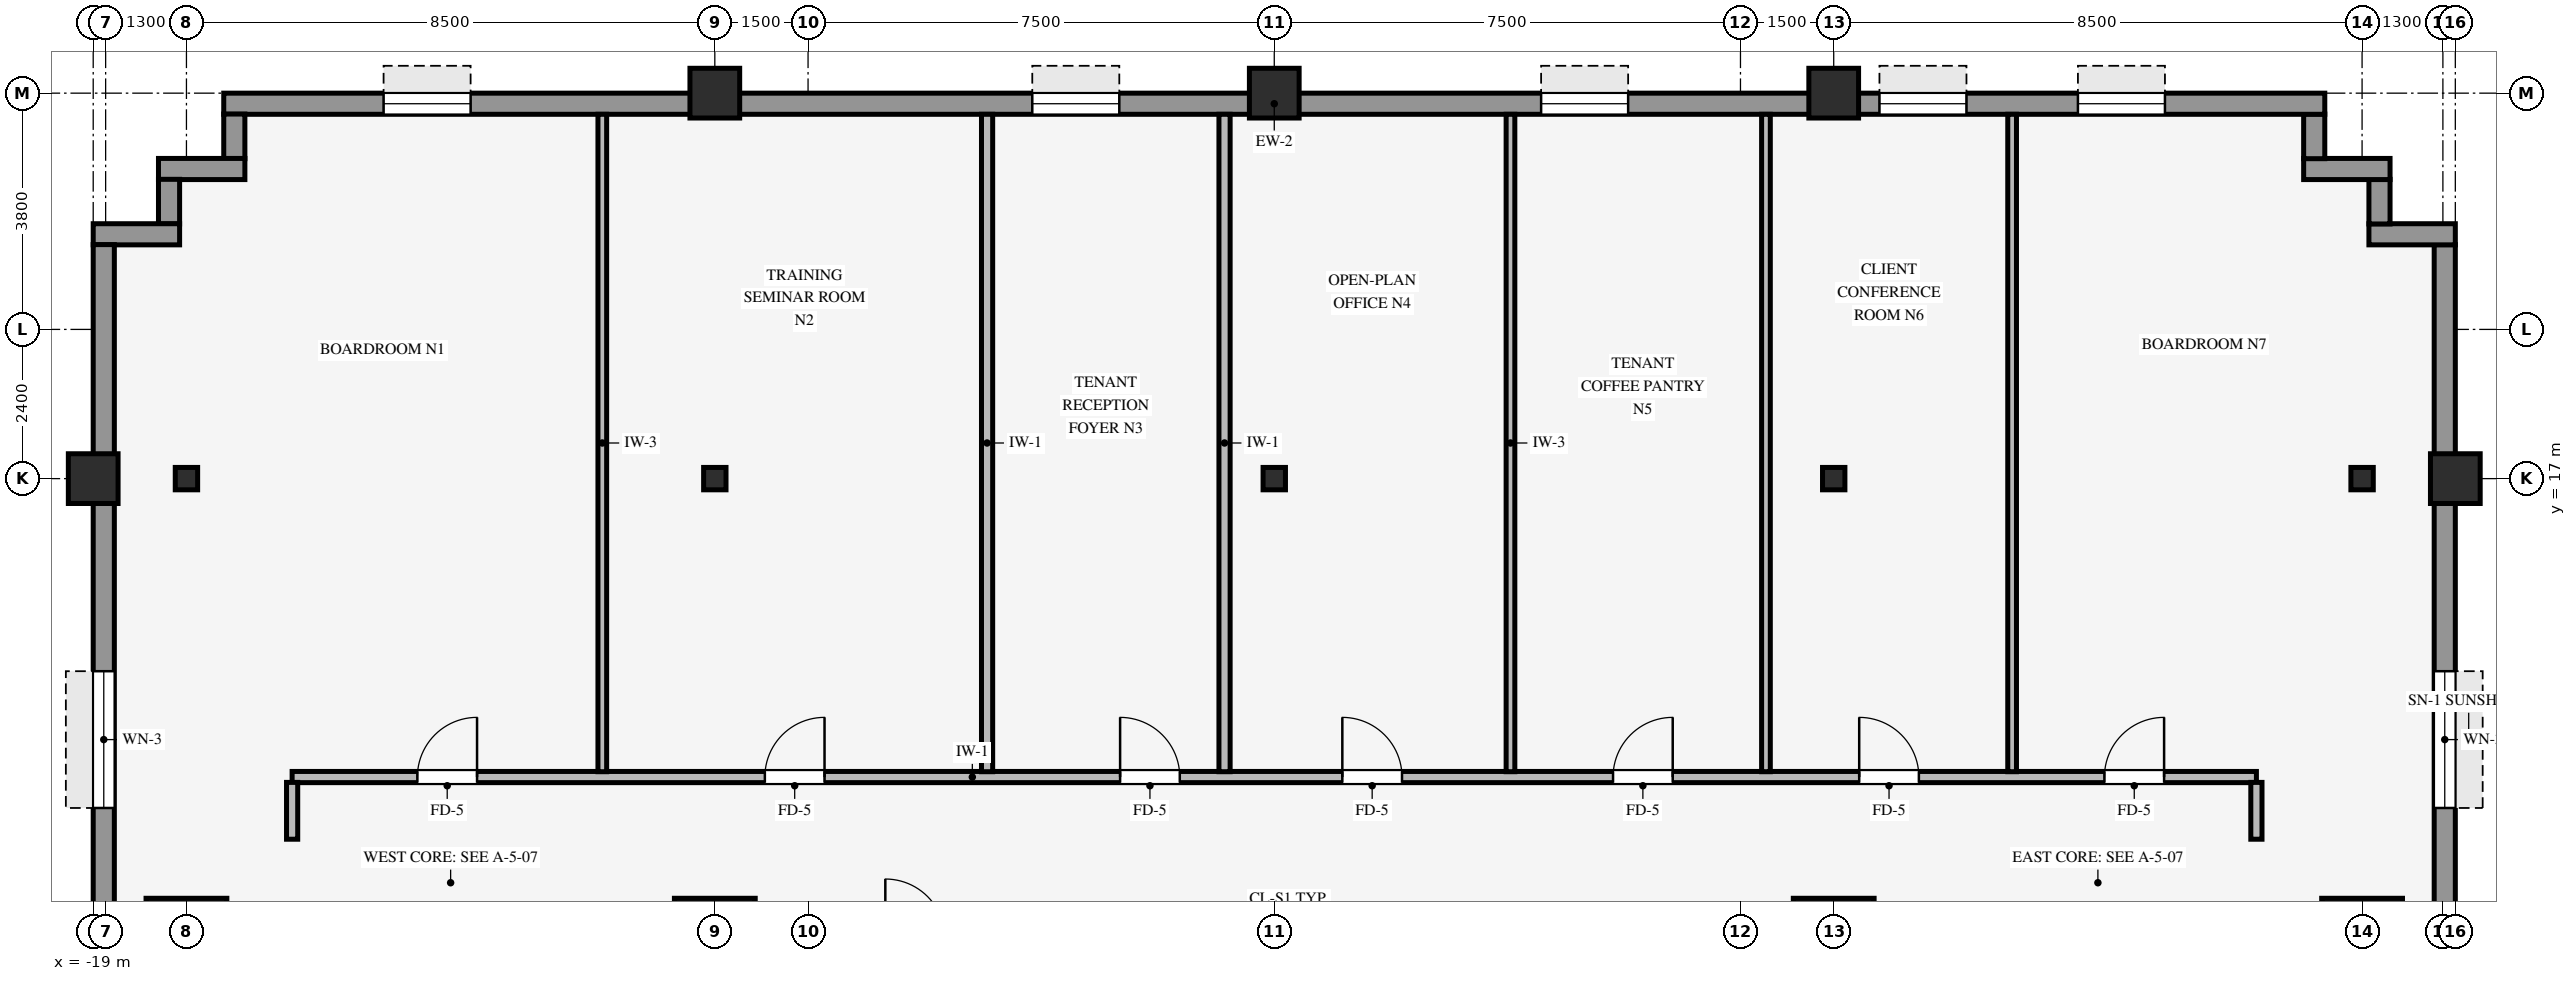
"""IFC4 building model, lengths in metres.
Left out: names, types, materials, properties, quantities, classifications, styles, units other than length and angle.
Written with IfcOpenShell. Run it as: python <this file> out.ifc"""

import sys

from ifc_helpers import new_model, si_unit, direction, frame, frame_2d, origin, origin_2d, place, context, subcontext, project, spatial, rectangle, hollow_rectangle, i_section, extrude, source, transform, mapped, element, fill, save


model = new_model("IFC4")
c1 = context("Model", 3, precision=1e-05, world=origin(), true_north=direction((0.0, 1.0)))
c2 = subcontext(c1, "Body", "Model", "MODEL_VIEW")
j1 = project(units=[si_unit("LENGTHUNIT", "METRE"), si_unit("PLANEANGLEUNIT", "RADIAN")], contexts=[c1])
p1 = place(None, origin())
s1 = spatial("IfcSite", under=j1, at=p1, CompositionType="ELEMENT")
p2 = place(p1, origin())
s2 = spatial("IfcBuilding", under=s1, at=p2, CompositionType="ELEMENT")
p3 = place(p2, frame((0.0, 0.0, 31.25)))
s3 = spatial("IfcBuildingStorey", under=s2, at=p3, CompositionType="ELEMENT", Elevation=31.25)
for number, where, z_axis, x_axis in (
    (1, (-17.5, 9.6, 0.0), (0.0, 0.0, 1.0), (1.0, 0.0, 0.0)),
    (2, (-9.0, 9.6, 0.0), (0.0, 0.0, 1.0), (1.0, 0.0, 0.0)),
    (3, (9.0, 9.6, 0.0), (0.0, 0.0, 1.0), (1.0, 0.0, 0.0)),
    (4, (17.5, 9.6, 0.0), (0.0, 0.0, 1.0), (1.0, 0.0, 0.0)),
):
    element("IfcColumn", number, at=place(p3, frame(where, z_axis=z_axis, x_axis=x_axis)), inside=s3, PredefinedType="COLUMN", context=c2, shape_type="SweptSolid", body=[
        extrude(rectangle(XDim=1.3, YDim=1.3, at=origin_2d()), origin(), (0.0, 0.0, 1.0), 3.37),
    ])
for number, where, z_axis, x_axis in (
    (5, (-19.0, 17.0, 0.0), (0.0, 0.0, 1.0), (1.0, 0.0, 0.0)),
    (6, (19.0, 17.0, 0.0), (0.0, 0.0, 1.0), (1.0, 0.0, 0.0)),
    (7, (-9.0, 23.2, 0.0), (0.0, 0.0, 1.0), (1.0, 0.0, 0.0)),
    (8, (0.0, 23.2, 0.0), (0.0, 0.0, 1.0), (1.0, 0.0, 0.0)),
    (9, (9.0, 23.2, 0.0), (0.0, 0.0, 1.0), (1.0, 0.0, 0.0)),
):
    element("IfcColumn", number, at=place(p3, frame(where, z_axis=z_axis, x_axis=x_axis)), inside=s3, PredefinedType="COLUMN", context=c2, shape_type="SweptSolid", body=[
        extrude(hollow_rectangle(XDim=0.8, YDim=0.8, WallThickness=0.055, InnerFilletRadius=0.055, OuterFilletRadius=0.11, at=origin_2d()), origin(), (0.0, 0.0, 1.0), 3.37),
    ])
for number, where, z_axis, x_axis in (
    (10, (0.0, 17.0, 0.0), (0.0, 0.0, 1.0), (1.0, 0.0, 0.0)),
    (11, (-17.5, 17.0, 0.0), (0.0, 0.0, 1.0), (1.0, 0.0, 0.0)),
    (12, (-9.0, 17.0, 0.0), (0.0, 0.0, 1.0), (1.0, 0.0, 0.0)),
    (13, (9.0, 17.0, 0.0), (0.0, 0.0, 1.0), (1.0, 0.0, 0.0)),
    (14, (17.5, 17.0, 0.0), (0.0, 0.0, 1.0), (1.0, 0.0, 0.0)),
):
    element("IfcColumn", number, at=place(p3, frame(where, z_axis=z_axis, x_axis=x_axis)), inside=s3, PredefinedType="COLUMN", context=c2, shape_type="SweptSolid", body=[
        extrude(i_section(OverallWidth=0.36, OverallDepth=0.36, WebThickness=0.021, FlangeThickness=0.021, FilletRadius=0.018, at=origin_2d()), origin(), (0.0, 0.0, 1.0), 3.37),
    ])
p4 = place(p3, frame((18.83, -20.764, 0.0), z_axis=(0.0, 0.0, 1.0), x_axis=(0.0, 1.0, 0.0)))
e15 = element("IfcWall", 15, at=p4, inside=s3, PredefinedType="STANDARD", context=c2, shape_type="SweptSolid", body=[
    extrude(rectangle(XDim=41.528, YDim=0.34, at=frame_2d((20.764, 0.0))), origin(), (0.0, 0.0, 1.0), 2.705),
])
p5 = place(p4, frame((6.862, 0.0, 0.8)))
e16 = element("IfcOpeningElement", 16, at=p5, cuts=e15, PredefinedType="OPENING", context=c2, shape_type="SweptSolid", body=[
    extrude(rectangle(XDim=2.2, YDim=1.65, at=frame_2d((1.1, 0.825))), frame((0.0, 0.18, 0.0), z_axis=(0.0, -1.0, 0.0), x_axis=(1.0, 0.0, 0.0)), (0.0, 0.0, 1.0), 0.36),
])
p6 = place(p4, frame((32.467, 0.0, 0.8)))
e17 = element("IfcOpeningElement", 17, at=p6, cuts=e15, PredefinedType="OPENING", context=c2, shape_type="SweptSolid", body=[
    extrude(rectangle(XDim=2.2, YDim=1.65, at=frame_2d((1.1, 0.825))), frame((0.0, 0.18, 0.0), z_axis=(0.0, -1.0, 0.0), x_axis=(1.0, 0.0, 0.0)), (0.0, 0.0, 1.0), 0.36),
])
p7 = place(p3, frame((17.61, 20.93, 0.0), z_axis=(0.0, 0.0, 1.0), x_axis=(1.0, 0.0, 0.0)))
e18 = element("IfcWall", 18, at=p7, inside=s3, PredefinedType="STANDARD", context=c2, shape_type="SweptSolid", body=[
    extrude(rectangle(XDim=1.39, YDim=0.34, at=frame_2d((0.695, 0.0))), origin(), (0.0, 0.0, 1.0), 3.36),
])
p8 = place(p3, frame((17.78, 21.096, 0.0), z_axis=(0.0, 0.0, 1.0), x_axis=(0.0, 1.0, 0.0)))
e19 = element("IfcWall", 19, at=p8, inside=s3, PredefinedType="STANDARD", context=c2, shape_type="SweptSolid", body=[
    extrude(rectangle(XDim=0.718, YDim=0.34, at=frame_2d((0.359, 0.0))), origin(), (0.0, 0.0, 1.0), 3.36),
])
p9 = place(p3, frame((16.56, 21.98, 0.0), z_axis=(0.0, 0.0, 1.0), x_axis=(1.0, 0.0, 0.0)))
e20 = element("IfcWall", 20, at=p9, inside=s3, PredefinedType="STANDARD", context=c2, shape_type="SweptSolid", body=[
    extrude(rectangle(XDim=1.39, YDim=0.34, at=frame_2d((0.695, 0.0))), origin(), (0.0, 0.0, 1.0), 3.36),
])
p10 = place(p3, frame((16.73, 22.146, 0.0), z_axis=(0.0, 0.0, 1.0), x_axis=(0.0, 1.0, 0.0)))
e21 = element("IfcWall", 21, at=p10, inside=s3, PredefinedType="STANDARD", context=c2, shape_type="SweptSolid", body=[
    extrude(rectangle(XDim=0.718, YDim=0.34, at=frame_2d((0.359, 0.0))), origin(), (0.0, 0.0, 1.0), 3.36),
])
p11 = place(p3, frame((-16.9, 23.03, 0.0), z_axis=(0.0, 0.0, 1.0), x_axis=(1.0, 0.0, 0.0)))
e22 = element("IfcWall", 22, at=p11, inside=s3, PredefinedType="STANDARD", context=c2, shape_type="SweptSolid", body=[
    extrude(rectangle(XDim=33.8, YDim=0.34, at=frame_2d((16.9, 0.0))), origin(), (0.0, 0.0, 1.0), 2.705),
])
p12 = place(p11, frame((2.571, 0.0, 0.8)))
e23 = element("IfcOpeningElement", 23, at=p12, cuts=e22, PredefinedType="OPENING", context=c2, shape_type="SweptSolid", body=[
    extrude(rectangle(XDim=1.4, YDim=1.65, at=frame_2d((0.7, 0.825))), frame((0.0, 0.18, 0.0), z_axis=(0.0, -1.0, 0.0), x_axis=(1.0, 0.0, 0.0)), (0.0, 0.0, 1.0), 0.36),
])
p13 = place(p11, frame((13.007, 0.0, 0.8)))
e24 = element("IfcOpeningElement", 24, at=p13, cuts=e22, PredefinedType="OPENING", context=c2, shape_type="SweptSolid", body=[
    extrude(rectangle(XDim=1.4, YDim=1.65, at=frame_2d((0.7, 0.825))), frame((0.0, 0.18, 0.0), z_axis=(0.0, -1.0, 0.0), x_axis=(1.0, 0.0, 0.0)), (0.0, 0.0, 1.0), 0.36),
])
p14 = place(p11, frame((21.193, 0.0, 0.8)))
e25 = element("IfcOpeningElement", 25, at=p14, cuts=e22, PredefinedType="OPENING", context=c2, shape_type="SweptSolid", body=[
    extrude(rectangle(XDim=1.4, YDim=1.65, at=frame_2d((0.7, 0.825))), frame((0.0, 0.18, 0.0), z_axis=(0.0, -1.0, 0.0), x_axis=(1.0, 0.0, 0.0)), (0.0, 0.0, 1.0), 0.36),
])
p15 = place(p11, frame((26.636, 0.0, 0.8)))
e26 = element("IfcOpeningElement", 26, at=p15, cuts=e22, PredefinedType="OPENING", context=c2, shape_type="SweptSolid", body=[
    extrude(rectangle(XDim=1.4, YDim=1.65, at=frame_2d((0.7, 0.825))), frame((0.0, 0.18, 0.0), z_axis=(0.0, -1.0, 0.0), x_axis=(1.0, 0.0, 0.0)), (0.0, 0.0, 1.0), 0.36),
])
p16 = place(p11, frame((29.829, 0.0, 0.8)))
e27 = element("IfcOpeningElement", 27, at=p16, cuts=e22, PredefinedType="OPENING", context=c2, shape_type="SweptSolid", body=[
    extrude(rectangle(XDim=1.4, YDim=1.65, at=frame_2d((0.7, 0.825))), frame((0.0, 0.18, 0.0), z_axis=(0.0, -1.0, 0.0), x_axis=(1.0, 0.0, 0.0)), (0.0, 0.0, 1.0), 0.36),
])
p17 = place(p3, frame((-16.73, 22.146, 0.0), z_axis=(0.0, 0.0, 1.0), x_axis=(0.0, 1.0, 0.0)))
e28 = element("IfcWall", 28, at=p17, inside=s3, PredefinedType="STANDARD", context=c2, shape_type="SweptSolid", body=[
    extrude(rectangle(XDim=0.718, YDim=0.34, at=frame_2d((0.359, 0.0))), origin(), (0.0, 0.0, 1.0), 3.36),
])
p18 = place(p3, frame((-17.95, 21.98, 0.0), z_axis=(0.0, 0.0, 1.0), x_axis=(1.0, 0.0, 0.0)))
e29 = element("IfcWall", 29, at=p18, inside=s3, PredefinedType="STANDARD", context=c2, shape_type="SweptSolid", body=[
    extrude(rectangle(XDim=1.39, YDim=0.34, at=frame_2d((0.695, 0.0))), origin(), (0.0, 0.0, 1.0), 3.36),
])
p19 = place(p3, frame((-17.78, 21.096, 0.0), z_axis=(0.0, 0.0, 1.0), x_axis=(0.0, 1.0, 0.0)))
e30 = element("IfcWall", 30, at=p19, inside=s3, PredefinedType="STANDARD", context=c2, shape_type="SweptSolid", body=[
    extrude(rectangle(XDim=0.718, YDim=0.34, at=frame_2d((0.359, 0.0))), origin(), (0.0, 0.0, 1.0), 3.36),
])
p20 = place(p3, frame((-19.0, 20.93, 0.0), z_axis=(0.0, 0.0, 1.0), x_axis=(1.0, 0.0, 0.0)))
e31 = element("IfcWall", 31, at=p20, inside=s3, PredefinedType="STANDARD", context=c2, shape_type="SweptSolid", body=[
    extrude(rectangle(XDim=1.39, YDim=0.34, at=frame_2d((0.695, 0.0))), origin(), (0.0, 0.0, 1.0), 3.36),
])
p21 = place(p3, frame((-18.83, -20.764, 0.0), z_axis=(0.0, 0.0, 1.0), x_axis=(0.0, 1.0, 0.0)))
e32 = element("IfcWall", 32, at=p21, inside=s3, PredefinedType="STANDARD", context=c2, shape_type="SweptSolid", body=[
    extrude(rectangle(XDim=41.528, YDim=0.34, at=frame_2d((20.764, 0.0))), origin(), (0.0, 0.0, 1.0), 2.705),
])
p22 = place(p21, frame((6.864, 0.0, 0.0)))
e33 = element("IfcOpeningElement", 33, at=p22, cuts=e32, PredefinedType="OPENING", context=c2, shape_type="SweptSolid", body=[
    extrude(rectangle(XDim=1.05, YDim=2.1, at=frame_2d((0.525, 1.05))), frame((0.0, 0.18, 0.0), z_axis=(0.0, -1.0, 0.0), x_axis=(1.0, 0.0, 0.0)), (0.0, 0.0, 1.0), 0.36),
])
p23 = place(p21, frame((32.467, 0.0, 0.8)))
e34 = element("IfcOpeningElement", 34, at=p23, cuts=e32, PredefinedType="OPENING", context=c2, shape_type="SweptSolid", body=[
    extrude(rectangle(XDim=2.2, YDim=1.65, at=frame_2d((1.1, 0.825))), frame((0.0, 0.18, 0.0), z_axis=(0.0, -1.0, 0.0), x_axis=(1.0, 0.0, 0.0)), (0.0, 0.0, 1.0), 0.36),
])
p24 = place(p3, frame((-15.8, 12.2, 0.0), z_axis=(0.0, 0.0, 1.0), x_axis=(1.0, 0.0, 0.0)))
e35 = element("IfcWall", 35, at=p24, inside=s3, PredefinedType="PARTITIONING", context=c2, shape_type="SweptSolid", body=[
    extrude(rectangle(XDim=31.6, YDim=0.18, at=frame_2d((15.8, 0.0))), origin(), (0.0, 0.0, 1.0), 3.36),
])
p25 = place(p24, frame((7.605, 0.0, 0.0)))
e36 = element("IfcOpeningElement", 36, at=p25, cuts=e35, PredefinedType="OPENING", context=c2, shape_type="SweptSolid", body=[
    extrude(rectangle(XDim=0.96, YDim=2.1, at=frame_2d((0.48, 1.05))), frame((0.0, 0.1, 0.0), z_axis=(0.0, -1.0, 0.0), x_axis=(1.0, 0.0, 0.0)), (0.0, 0.0, 1.0), 0.2),
])
p26 = place(p24, frame((2.015, 0.0, 0.0)))
e37 = element("IfcOpeningElement", 37, at=p26, cuts=e35, PredefinedType="OPENING", context=c2, shape_type="SweptSolid", body=[
    extrude(rectangle(XDim=0.96, YDim=2.1, at=frame_2d((0.48, 1.05))), frame((0.0, 0.1, 0.0), z_axis=(0.0, -1.0, 0.0), x_axis=(1.0, 0.0, 0.0)), (0.0, 0.0, 1.0), 0.2),
])
p27 = place(p24, frame((16.895, 0.0, 0.0)))
e38 = element("IfcOpeningElement", 38, at=p27, cuts=e35, PredefinedType="OPENING", context=c2, shape_type="SweptSolid", body=[
    extrude(rectangle(XDim=0.96, YDim=2.1, at=frame_2d((0.48, 1.05))), frame((0.0, 0.1, 0.0), z_axis=(0.0, -1.0, 0.0), x_axis=(1.0, 0.0, 0.0)), (0.0, 0.0, 1.0), 0.2),
])
p28 = place(p24, frame((21.25, 0.0, 0.0)))
e39 = element("IfcOpeningElement", 39, at=p28, cuts=e35, PredefinedType="OPENING", context=c2, shape_type="SweptSolid", body=[
    extrude(rectangle(XDim=0.96, YDim=2.1, at=frame_2d((0.48, 1.05))), frame((0.0, 0.1, 0.0), z_axis=(0.0, -1.0, 0.0), x_axis=(1.0, 0.0, 0.0)), (0.0, 0.0, 1.0), 0.2),
])
p29 = place(p24, frame((25.21, 0.0, 0.0)))
e40 = element("IfcOpeningElement", 40, at=p29, cuts=e35, PredefinedType="OPENING", context=c2, shape_type="SweptSolid", body=[
    extrude(rectangle(XDim=0.96, YDim=2.1, at=frame_2d((0.48, 1.05))), frame((0.0, 0.1, 0.0), z_axis=(0.0, -1.0, 0.0), x_axis=(1.0, 0.0, 0.0)), (0.0, 0.0, 1.0), 0.2),
])
p30 = place(p24, frame((29.155, 0.0, 0.0)))
e41 = element("IfcOpeningElement", 41, at=p30, cuts=e35, PredefinedType="OPENING", context=c2, shape_type="SweptSolid", body=[
    extrude(rectangle(XDim=0.96, YDim=2.1, at=frame_2d((0.48, 1.05))), frame((0.0, 0.1, 0.0), z_axis=(0.0, -1.0, 0.0), x_axis=(1.0, 0.0, 0.0)), (0.0, 0.0, 1.0), 0.2),
])
p31 = place(p24, frame((13.32, 0.0, 0.0)))
e42 = element("IfcOpeningElement", 42, at=p31, cuts=e35, PredefinedType="OPENING", context=c2, shape_type="SweptSolid", body=[
    extrude(rectangle(XDim=0.96, YDim=2.1, at=frame_2d((0.48, 1.05))), frame((0.0, 0.1, 0.0), z_axis=(0.0, -1.0, 0.0), x_axis=(1.0, 0.0, 0.0)), (0.0, 0.0, 1.0), 0.2),
])
p32 = place(p3, frame((-15.8, 11.2, 0.0), z_axis=(0.0, 0.0, 1.0), x_axis=(0.0, 1.0, 0.0)))
e43 = element("IfcWall", 43, at=p32, inside=s3, PredefinedType="PARTITIONING", context=c2, shape_type="SweptSolid", body=[
    extrude(rectangle(XDim=0.914, YDim=0.18, at=frame_2d((0.457, 0.0))), origin(), (0.0, 0.0, 1.0), 3.36),
])
p33 = place(p3, frame((-10.81, 12.286, 0.0), z_axis=(0.0, 0.0, 1.0), x_axis=(0.0, 1.0, 0.0)))
e44 = element("IfcWall", 44, at=p33, inside=s3, PredefinedType="PARTITIONING", context=c2, shape_type="SweptSolid", body=[
    extrude(rectangle(XDim=10.574, YDim=0.14, at=frame_2d((5.287, 0.0))), origin(), (0.0, 0.0, 1.0), 3.36),
])
for number, where, z_axis, x_axis in (
    (45, (-4.62, 12.286, 0.0), (0.0, 0.0, 1.0), (0.0, 1.0, 0.0)),
    (46, (-0.8, 12.286, 0.0), (0.0, 0.0, 1.0), (0.0, 1.0, 0.0)),
):
    element("IfcWall", number, at=place(p3, frame(where, z_axis=z_axis, x_axis=x_axis)), inside=s3, PredefinedType="PARTITIONING", context=c2, shape_type="SweptSolid", body=[
        extrude(rectangle(XDim=10.574, YDim=0.18, at=frame_2d((5.287, 0.0))), origin(), (0.0, 0.0, 1.0), 3.36),
    ])
for number, where, z_axis, x_axis in (
    (47, (3.8, 12.286, 0.0), (0.0, 0.0, 1.0), (0.0, 1.0, 0.0)),
    (48, (7.91, 12.286, 0.0), (0.0, 0.0, 1.0), (0.0, 1.0, 0.0)),
    (49, (11.87, 12.286, 0.0), (0.0, 0.0, 1.0), (0.0, 1.0, 0.0)),
):
    element("IfcWall", number, at=place(p3, frame(where, z_axis=z_axis, x_axis=x_axis)), inside=s3, PredefinedType="PARTITIONING", context=c2, shape_type="SweptSolid", body=[
        extrude(rectangle(XDim=10.574, YDim=0.14, at=frame_2d((5.287, 0.0))), origin(), (0.0, 0.0, 1.0), 3.36),
    ])
p34 = place(p3, frame((15.8, 11.2, 0.0), z_axis=(0.0, 0.0, 1.0), x_axis=(0.0, 1.0, 0.0)))
e50 = element("IfcWall", 50, at=p34, inside=s3, PredefinedType="PARTITIONING", context=c2, shape_type="SweptSolid", body=[
    extrude(rectangle(XDim=0.914, YDim=0.18, at=frame_2d((0.457, 0.0))), origin(), (0.0, 0.0, 1.0), 3.36),
])
m1 = source(origin(), c2, "Body", "SweptSolid", [
    extrude(rectangle(XDim=2.2, YDim=1.65, at=frame_2d((1.1, 0.825))), frame((0.0, 0.03, 0.0), z_axis=(0.0, -1.0, 0.0), x_axis=(1.0, 0.0, 0.0)), (0.0, 0.0, 1.0), 0.06),
])
p35 = place(p6, origin())
e51 = element("IfcWindow", 51, at=p35, inside=s3, PartitioningType="SINGLE_PANEL", PredefinedType="WINDOW", context=c2, shape_type="MappedRepresentation", body=[
    mapped(m1, transform((0.0, 0.0, 0.0), scale=1.0)),
])
fill(e17, e51)
m2 = source(origin(), c2, "Body", "SweptSolid", [
    extrude(rectangle(XDim=1.4, YDim=1.65, at=frame_2d((0.7, 0.825))), frame((0.0, 0.03, 0.0), z_axis=(0.0, -1.0, 0.0), x_axis=(1.0, 0.0, 0.0)), (0.0, 0.0, 1.0), 0.06),
])
p36 = place(p12, origin())
e52 = element("IfcWindow", 52, at=p36, inside=s3, PartitioningType="SINGLE_PANEL", PredefinedType="WINDOW", context=c2, shape_type="MappedRepresentation", body=[
    mapped(m2, transform((0.0, 0.0, 0.0), scale=1.0)),
])
fill(e23, e52)
p37 = place(p13, origin())
e53 = element("IfcWindow", 53, at=p37, inside=s3, PartitioningType="SINGLE_PANEL", PredefinedType="WINDOW", context=c2, shape_type="MappedRepresentation", body=[
    mapped(m2, transform((0.0, 0.0, 0.0), scale=1.0)),
])
fill(e24, e53)
p38 = place(p14, origin())
e54 = element("IfcWindow", 54, at=p38, inside=s3, PartitioningType="SINGLE_PANEL", PredefinedType="WINDOW", context=c2, shape_type="MappedRepresentation", body=[
    mapped(m2, transform((0.0, 0.0, 0.0), scale=1.0)),
])
fill(e25, e54)
p39 = place(p15, origin())
e55 = element("IfcWindow", 55, at=p39, inside=s3, PartitioningType="SINGLE_PANEL", PredefinedType="WINDOW", context=c2, shape_type="MappedRepresentation", body=[
    mapped(m2, transform((0.0, 0.0, 0.0), scale=1.0)),
])
fill(e26, e55)
p40 = place(p16, origin())
e56 = element("IfcWindow", 56, at=p40, inside=s3, PartitioningType="SINGLE_PANEL", PredefinedType="WINDOW", context=c2, shape_type="MappedRepresentation", body=[
    mapped(m2, transform((0.0, 0.0, 0.0), scale=1.0)),
])
fill(e27, e56)
p41 = place(p23, origin())
e57 = element("IfcWindow", 57, at=p41, inside=s3, PartitioningType="SINGLE_PANEL", PredefinedType="WINDOW", context=c2, shape_type="MappedRepresentation", body=[
    mapped(m1, transform((0.0, 0.0, 0.0), scale=1.0)),
])
fill(e34, e57)
m3 = source(origin(), c2, "Body", "SweptSolid", [
    extrude(rectangle(XDim=0.96, YDim=2.1, at=frame_2d((0.48, 1.05))), frame((0.0, 0.025, 0.0), z_axis=(0.0, -1.0, 0.0), x_axis=(1.0, 0.0, 0.0)), (0.0, 0.0, 1.0), 0.05),
])
p42 = place(p25, origin())
e58 = element("IfcDoor", 58, at=p42, inside=s3, OperationType="SINGLE_SWING_RIGHT", PredefinedType="DOOR", context=c2, shape_type="MappedRepresentation", body=[
    mapped(m3, transform((0.0, 0.0, 0.0), scale=1.0)),
])
fill(e36, e58)
p43 = place(p26, origin())
e59 = element("IfcDoor", 59, at=p43, inside=s3, OperationType="SINGLE_SWING_RIGHT", PredefinedType="DOOR", context=c2, shape_type="MappedRepresentation", body=[
    mapped(m3, transform((0.0, 0.0, 0.0), scale=1.0)),
])
fill(e37, e59)
p44 = place(p27, origin())
e60 = element("IfcDoor", 60, at=p44, inside=s3, OperationType="SINGLE_SWING_LEFT", PredefinedType="DOOR", context=c2, shape_type="MappedRepresentation", body=[
    mapped(m3, transform((0.0, 0.0, 0.0), scale=1.0)),
])
fill(e38, e60)
p45 = place(p28, origin())
e61 = element("IfcDoor", 61, at=p45, inside=s3, OperationType="SINGLE_SWING_RIGHT", PredefinedType="DOOR", context=c2, shape_type="MappedRepresentation", body=[
    mapped(m3, transform((0.0, 0.0, 0.0), scale=1.0)),
])
fill(e39, e61)
p46 = place(p29, origin())
e62 = element("IfcDoor", 62, at=p46, inside=s3, OperationType="SINGLE_SWING_LEFT", PredefinedType="DOOR", context=c2, shape_type="MappedRepresentation", body=[
    mapped(m3, transform((0.0, 0.0, 0.0), scale=1.0)),
])
fill(e40, e62)
p47 = place(p30, origin())
e63 = element("IfcDoor", 63, at=p47, inside=s3, OperationType="SINGLE_SWING_RIGHT", PredefinedType="DOOR", context=c2, shape_type="MappedRepresentation", body=[
    mapped(m3, transform((0.0, 0.0, 0.0), scale=1.0)),
])
fill(e41, e63)
p48 = place(p31, origin())
e64 = element("IfcDoor", 64, at=p48, inside=s3, OperationType="SINGLE_SWING_LEFT", PredefinedType="DOOR", context=c2, shape_type="MappedRepresentation", body=[
    mapped(m3, transform((0.0, 0.0, 0.0), scale=1.0)),
])
fill(e42, e64)
save(model, sys.argv[1])
